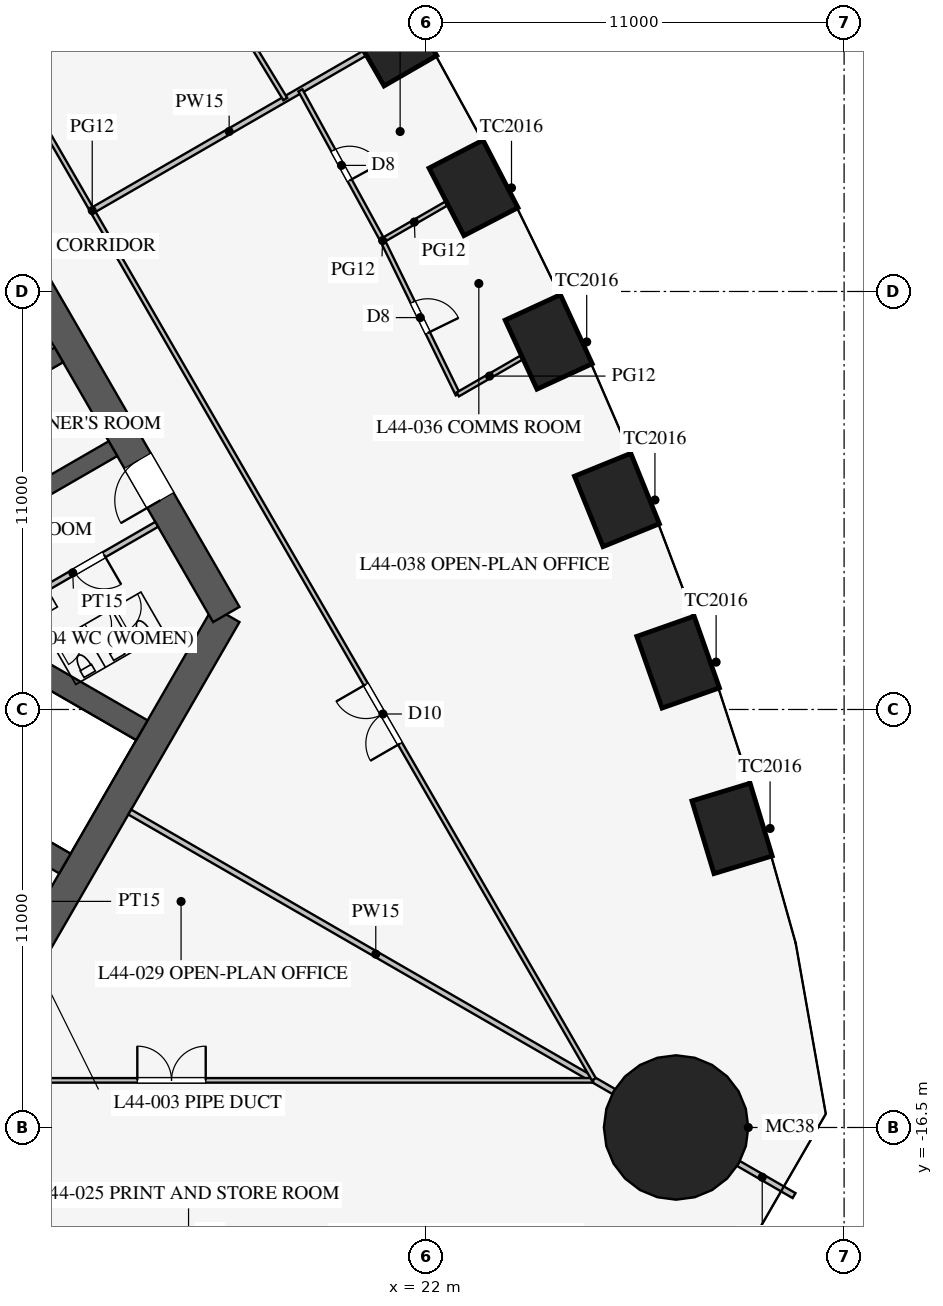
"""IFC4 building model, lengths in metres.
Left out: names, types, materials, properties, quantities, classifications, styles, units other than length and angle.
Written with IfcOpenShell. Run it as: python <this file> out.ifc"""

import sys

from ifc_helpers import new_model, si_unit, direction, frame, frame_2d, origin, origin_2d, place, context, subcontext, project, spatial, rectangle, circle, extrude, element, fill, save


model = new_model("IFC4")
c1 = context("Model", 3, precision=1e-05, world=origin(), true_north=direction((0.0, 1.0)))
c2 = subcontext(c1, "Body", "Model", "MODEL_VIEW")
j1 = project(units=[si_unit("LENGTHUNIT", "METRE"), si_unit("PLANEANGLEUNIT", "RADIAN")], contexts=[c1])
p1 = place(None, origin())
s1 = spatial("IfcSite", under=j1, at=p1, CompositionType="ELEMENT")
p2 = place(p1, origin())
s2 = spatial("IfcBuilding", under=s1, at=p2, CompositionType="ELEMENT")
p3 = place(p2, frame((0.0, 0.0, 193.9)))
s3 = spatial("IfcBuildingStorey", under=s2, at=p3, CompositionType="ELEMENT", Elevation=193.9)
for number, where, z_axis, x_axis in (
    (1, (30.052, -8.63, 0.0), (0.0, 0.0, 1.0), (-0.29, 0.957, 0.0)),
    (2, (28.632, -4.254, 0.0), (0.0, 0.0, 1.0), (-0.332, 0.943, 0.0)),
    (3, (27.022, 0.013, 0.0), (0.0, 0.0, 1.0), (-0.376, 0.927, 0.0)),
    (4, (25.227, 4.172, 0.0), (0.0, 0.0, 1.0), (-0.418, 0.908, 0.0)),
    (5, (23.248, 8.226, 0.0), (0.0, 0.0, 1.0), (-0.46, 0.888, 0.0)),
    (6, (21.088, 12.175, 0.0), (0.0, 0.0, 1.0), (-0.5, 0.866, 0.0)),
):
    element("IfcColumn", number, at=place(p3, frame(where, z_axis=z_axis, x_axis=x_axis)), inside=s3, PredefinedType="COLUMN", context=c2, shape_type="SweptSolid", body=[
        extrude(rectangle(XDim=2.0, YDim=1.6, at=origin_2d()), origin(), (0.0, 0.0, 1.0), 4.2),
    ])
p4 = place(p3, frame((28.579, -16.5, 0.0), z_axis=(0.0, 0.0, 1.0), x_axis=(1.0, 0.0, 0.0)))
e7 = element("IfcColumn", 7, at=p4, inside=s3, PredefinedType="COLUMN", context=c2, shape_type="SweptSolid", body=[
    extrude(circle(Radius=1.9, at=origin_2d()), origin(), (0.0, 0.0, 1.0), 4.2),
])
p5 = place(p3, frame((10.97, -13.0, 0.0), z_axis=(0.0, 0.0, 1.0), x_axis=(0.499995765644, 0.866027848477, 0.0)))
e8 = element("IfcWall", 8, at=p5, inside=s3, PredefinedType="SHEAR", context=c2, shape_type="SweptSolid", body=[
    extrude(rectangle(XDim=11.547, YDim=0.8, at=frame_2d((5.773, 0.0))), origin(), (0.0, 0.0, 1.0), 4.2),
])
p6 = place(p3, frame((16.743, -3.0, 0.0), z_axis=(0.0, 0.0, 1.0), x_axis=(-0.500002442456, 0.866023993627, 0.0)))
e9 = element("IfcWall", 9, at=p6, inside=s3, PredefinedType="SHEAR", context=c2, shape_type="SweptSolid", body=[
    extrude(rectangle(XDim=21.939, YDim=0.8, at=frame_2d((10.97, 0.0))), origin(), (0.0, 0.0, 1.0), 4.2),
])
p7 = place(p6, frame((17.27, 0.0, 0.0)))
e10 = element("IfcOpeningElement", 10, at=p7, cuts=e9, PredefinedType="OPENING", context=c2, shape_type="SweptSolid", body=[
    extrude(rectangle(XDim=1.2, YDim=2.1, at=frame_2d((0.6, 1.05))), frame((0.0, 0.41, 0.0), z_axis=(0.0, -1.0, 0.0), x_axis=(1.0, 0.0, 0.0)), (0.0, 0.0, 1.0), 0.82),
])
p8 = place(p6, frame((3.47, 0.0, 0.0)))
e11 = element("IfcOpeningElement", 11, at=p8, cuts=e9, PredefinedType="OPENING", context=c2, shape_type="SweptSolid", body=[
    extrude(rectangle(XDim=1.2, YDim=2.1, at=frame_2d((0.6, 1.05))), frame((0.0, 0.41, 0.0), z_axis=(0.0, -1.0, 0.0), x_axis=(1.0, 0.0, 0.0)), (0.0, 0.0, 1.0), 0.82),
])
for number, where, z_axis, x_axis in (
    (12, (11.532, 0.076, 0.0), (0.0, 0.0, 1.0), (0.866, 0.5, 0.0)),
    (13, (10.107, 2.544, 0.0), (0.0, 0.0, 1.0), (0.866, 0.5, 0.0)),
):
    element("IfcWall", number, at=place(p3, frame(where, z_axis=z_axis, x_axis=x_axis)), inside=s3, PredefinedType="SHEAR", context=c2, shape_type="SweptSolid", body=[
        extrude(rectangle(XDim=2.575, YDim=0.45, at=frame_2d((1.288, 0.0))), origin(), (0.0, 0.0, 1.0), 4.2),
    ])
for number, where, z_axis, x_axis in (
    (14, (4.638, -5.016, 0.0), (0.0, 0.0, 1.0), (0.866, -0.5, 0.0)),
    (15, (6.663, -1.509, 0.0), (0.0, 0.0, 1.0), (0.866, -0.5, 0.0)),
):
    element("IfcWall", number, at=place(p3, frame(where, z_axis=z_axis, x_axis=x_axis)), inside=s3, PredefinedType="SHEAR", context=c2, shape_type="SweptSolid", body=[
        extrude(rectangle(XDim=9.075, YDim=0.6, at=frame_2d((4.538, 0.0))), origin(), (0.0, 0.0, 1.0), 4.2),
    ])
p9 = place(p3, frame((10.495, -3.178, 0.0), z_axis=(0.0, 0.0, 1.0), x_axis=(0.86602216432, 0.500005610874, 0.0)))
e16 = element("IfcWall", 16, at=p9, inside=s3, PredefinedType="PARTITIONING", context=c2, shape_type="SweptSolid", body=[
    extrude(rectangle(XDim=5.1, YDim=0.15, at=frame_2d((2.55, 0.0))), origin(), (0.0, 0.0, 1.0), 4.0),
])
p10 = place(p9, frame((2.6, 0.0, 0.0)))
e17 = element("IfcOpeningElement", 17, at=p10, cuts=e16, PredefinedType="OPENING", context=c2, shape_type="SweptSolid", body=[
    extrude(rectangle(XDim=0.9, YDim=2.1, at=frame_2d((0.45, 1.05))), frame((0.0, 0.085, 0.0), z_axis=(0.0, -1.0, 0.0), x_axis=(1.0, 0.0, 0.0)), (0.0, 0.0, 1.0), 0.17),
])
p11 = place(p3, frame((14.203, -8.2, 0.0), z_axis=(0.0, 0.0, 1.0), x_axis=(0.866021600284, -0.500006587798, 0.0)))
e18 = element("IfcWall", 18, at=p11, inside=s3, PredefinedType="PARTITIONING", context=c2, shape_type="SweptSolid", body=[
    extrude(rectangle(XDim=14.95, YDim=0.15, at=frame_2d((7.475, 0.0))), origin(), (0.0, 0.0, 1.0), 2.4),
])
p12 = place(p3, frame((30.008, -17.325, 0.0), z_axis=(0.0, 0.0, 1.0), x_axis=(0.866013246922, -0.500021055713, 0.0)))
e19 = element("IfcWall", 19, at=p12, inside=s3, PredefinedType="PARTITIONING", context=c2, shape_type="SweptSolid", body=[
    extrude(rectangle(XDim=1.935, YDim=0.15, at=frame_2d((0.967, 0.0))), origin(), (0.0, 0.0, 1.0), 2.4),
])
p13 = place(p3, frame((-26.398, -15.26, 0.0), z_axis=(0.0, 0.0, 1.0), x_axis=(1.0, 0.0, 0.0)))
e20 = element("IfcWall", 20, at=p13, inside=s3, PredefinedType="PARTITIONING", context=c2, shape_type="SweptSolid", body=[
    extrude(rectangle(XDim=52.796, YDim=0.12, at=frame_2d((26.398, 0.0))), origin(), (0.0, 0.0, 1.0), 2.9),
])
p14 = place(p13, frame((10.2, 0.0, 0.15)))
e21 = element("IfcOpeningElement", 21, at=p14, cuts=e20, PredefinedType="OPENING", context=c2, shape_type="SweptSolid", body=[
    extrude(rectangle(XDim=1.8, YDim=2.1, at=frame_2d((0.9, 1.05))), frame((0.0, 0.07, 0.0), z_axis=(0.0, -1.0, 0.0), x_axis=(1.0, 0.0, 0.0)), (0.0, 0.0, 1.0), 0.14),
])
p15 = place(p13, frame((40.8, 0.0, 0.15)))
e22 = element("IfcOpeningElement", 22, at=p15, cuts=e20, PredefinedType="OPENING", context=c2, shape_type="SweptSolid", body=[
    extrude(rectangle(XDim=1.8, YDim=2.1, at=frame_2d((0.9, 1.05))), frame((0.0, 0.07, 0.0), z_axis=(0.0, -1.0, 0.0), x_axis=(1.0, 0.0, 0.0)), (0.0, 0.0, 1.0), 0.14),
])
p16 = place(p3, frame((13.268, 7.66, 0.0), z_axis=(0.0, 0.0, 1.0), x_axis=(0.866019499219, 0.500010226868, 0.0)))
e23 = element("IfcWall", 23, at=p16, inside=s3, PredefinedType="PARTITIONING", context=c2, shape_type="SweptSolid", body=[
    extrude(rectangle(XDim=8.2, YDim=0.15, at=frame_2d((4.1, 0.0))), origin(), (0.0, 0.0, 1.0), 2.992),
])
p17 = place(p3, frame((26.415, -15.231, 0.0), z_axis=(0.0, 0.0, 1.0), x_axis=(-0.50000091641, 0.866024874695, 0.0)))
e24 = element("IfcWall", 24, at=p17, inside=s3, PredefinedType="PARTITIONING", context=c2, shape_type="SweptSolid", body=[
    extrude(rectangle(XDim=52.796, YDim=0.12, at=frame_2d((26.398, 0.0))), origin(), (0.0, 0.0, 1.0), 2.9),
])
p18 = place(p17, frame((10.2, 0.0, 0.15)))
e25 = element("IfcOpeningElement", 25, at=p18, cuts=e24, PredefinedType="OPENING", context=c2, shape_type="SweptSolid", body=[
    extrude(rectangle(XDim=1.8, YDim=2.1, at=frame_2d((0.9, 1.05))), frame((0.0, 0.07, 0.0), z_axis=(0.0, -1.0, 0.0), x_axis=(1.0, 0.0, 0.0)), (0.0, 0.0, 1.0), 0.14),
])
p19 = place(p17, frame((40.8, 0.0, 0.15)))
e26 = element("IfcOpeningElement", 26, at=p19, cuts=e24, PredefinedType="OPENING", context=c2, shape_type="SweptSolid", body=[
    extrude(rectangle(XDim=1.8, YDim=2.1, at=frame_2d((0.9, 1.05))), frame((0.0, 0.07, 0.0), z_axis=(0.0, -1.0, 0.0), x_axis=(1.0, 0.0, 0.0)), (0.0, 0.0, 1.0), 0.14),
])
p20 = place(p3, frame((18.295, 10.563, 0.0), z_axis=(0.0, 0.0, 1.0), x_axis=(-0.519766265397, 0.854308509472, 0.0)))
e27 = element("IfcWall", 27, at=p20, inside=s3, PredefinedType="PARTITIONING", context=c2, shape_type="SweptSolid", body=[
    extrude(rectangle(XDim=4.501, YDim=0.12, at=frame_2d((2.25, 0.0))), origin(), (0.0, 0.0, 1.0), 2.9),
])
p21 = place(p20, frame((1.8, 0.0, 0.15)))
e28 = element("IfcOpeningElement", 28, at=p21, cuts=e27, PredefinedType="OPENING", context=c2, shape_type="SweptSolid", body=[
    extrude(rectangle(XDim=0.9, YDim=2.1, at=frame_2d((0.45, 1.05))), frame((0.0, 0.07, 0.0), z_axis=(0.0, -1.0, 0.0), x_axis=(1.0, 0.0, 0.0)), (0.0, 0.0, 1.0), 0.14),
])
p22 = place(p3, frame((20.854, 6.844, 0.0), z_axis=(0.0, 0.0, 1.0), x_axis=(-0.480014565702, 0.877260518155, 0.0)))
e29 = element("IfcWall", 29, at=p22, inside=s3, PredefinedType="PARTITIONING", context=c2, shape_type="SweptSolid", body=[
    extrude(rectangle(XDim=4.501, YDim=0.12, at=frame_2d((2.25, 0.0))), origin(), (0.0, 0.0, 1.0), 2.9),
])
p23 = place(p22, frame((1.8, 0.0, 0.15)))
e30 = element("IfcOpeningElement", 30, at=p23, cuts=e29, PredefinedType="OPENING", context=c2, shape_type="SweptSolid", body=[
    extrude(rectangle(XDim=0.9, YDim=2.1, at=frame_2d((0.45, 1.05))), frame((0.0, 0.07, 0.0), z_axis=(0.0, -1.0, 0.0), x_axis=(1.0, 0.0, 0.0)), (0.0, 0.0, 1.0), 0.14),
])
p24 = place(p3, frame((22.835, 2.792, 0.0), z_axis=(0.0, 0.0, 1.0), x_axis=(-0.43911984878, 0.898428493764, 0.0)))
e31 = element("IfcWall", 31, at=p24, inside=s3, PredefinedType="PARTITIONING", context=c2, shape_type="SweptSolid", body=[
    extrude(rectangle(XDim=4.511, YDim=0.12, at=frame_2d((2.255, 0.0))), origin(), (0.0, 0.0, 1.0), 2.9),
])
p25 = place(p24, frame((1.8, 0.0, 0.15)))
e32 = element("IfcOpeningElement", 32, at=p25, cuts=e31, PredefinedType="OPENING", context=c2, shape_type="SweptSolid", body=[
    extrude(rectangle(XDim=0.9, YDim=2.1, at=frame_2d((0.45, 1.05))), frame((0.0, 0.07, 0.0), z_axis=(0.0, -1.0, 0.0), x_axis=(1.0, 0.0, 0.0)), (0.0, 0.0, 1.0), 0.14),
])
p26 = place(p3, frame((20.854, 6.844, 0.0), z_axis=(0.0, 0.0, 1.0), x_axis=(0.866019431537, 0.500010344094, 0.0)))
e33 = element("IfcWall", 33, at=p26, inside=s3, PredefinedType="PARTITIONING", context=c2, shape_type="SweptSolid", body=[
    extrude(rectangle(XDim=1.933, YDim=0.12, at=frame_2d((0.967, 0.0))), origin(), (0.0, 0.0, 1.0), 2.9),
])
p27 = place(p3, frame((22.835, 2.792, 0.0), z_axis=(0.0, 0.0, 1.0), x_axis=(0.865997904316, 0.500047627452, 0.0)))
e34 = element("IfcWall", 34, at=p27, inside=s3, PredefinedType="PARTITIONING", context=c2, shape_type="SweptSolid", body=[
    extrude(rectangle(XDim=1.928, YDim=0.12, at=frame_2d((0.964, 0.0))), origin(), (0.0, 0.0, 1.0), 2.9),
])
p28 = place(p10, frame((0.9, 0.0, 0.0), z_axis=(0.0, 0.0, 1.0), x_axis=(-1.0, 0.0, 0.0)))
e35 = element("IfcDoor", 35, at=p28, inside=s3, OperationType="SINGLE_SWING_LEFT", PredefinedType="DOOR", context=c2, shape_type="SweptSolid", body=[
    extrude(rectangle(XDim=0.9, YDim=2.1, at=frame_2d((0.45, 1.05))), frame((0.0, 0.025, 0.0), z_axis=(0.0, -1.0, 0.0), x_axis=(1.0, 0.0, 0.0)), (0.0, 0.0, 1.0), 0.05),
])
fill(e17, e35)
p29 = place(p8, origin())
e36 = element("IfcDoor", 36, at=p29, inside=s3, OperationType="SINGLE_SWING_LEFT", PredefinedType="DOOR", context=c2, shape_type="SweptSolid", body=[
    extrude(rectangle(XDim=1.2, YDim=2.1, at=frame_2d((0.6, 1.05))), frame((0.0, 0.025, 0.0), z_axis=(0.0, -1.0, 0.0), x_axis=(1.0, 0.0, 0.0)), (0.0, 0.0, 1.0), 0.05),
])
fill(e11, e36)
p30 = place(p15, origin())
e37 = element("IfcDoor", 37, at=p30, inside=s3, OperationType="DOUBLE_DOOR_SINGLE_SWING", PredefinedType="DOOR", context=c2, shape_type="SweptSolid", body=[
    extrude(rectangle(XDim=1.8, YDim=2.1, at=frame_2d((0.9, 1.05))), frame((0.0, 0.025, 0.0), z_axis=(0.0, -1.0, 0.0), x_axis=(1.0, 0.0, 0.0)), (0.0, 0.0, 1.0), 0.05),
])
fill(e22, e37)
p31 = place(p23, frame((0.9, 0.0, 0.0), z_axis=(0.0, 0.0, 1.0), x_axis=(-1.0, 0.0, 0.0)))
e38 = element("IfcDoor", 38, at=p31, inside=s3, OperationType="SINGLE_SWING_RIGHT", PredefinedType="DOOR", context=c2, shape_type="SweptSolid", body=[
    extrude(rectangle(XDim=0.9, YDim=2.1, at=frame_2d((0.45, 1.05))), frame((0.0, 0.025, 0.0), z_axis=(0.0, -1.0, 0.0), x_axis=(1.0, 0.0, 0.0)), (0.0, 0.0, 1.0), 0.05),
])
fill(e30, e38)
p32 = place(p25, frame((0.9, 0.0, 0.0), z_axis=(0.0, 0.0, 1.0), x_axis=(-1.0, 0.0, 0.0)))
e39 = element("IfcDoor", 39, at=p32, inside=s3, OperationType="SINGLE_SWING_RIGHT", PredefinedType="DOOR", context=c2, shape_type="SweptSolid", body=[
    extrude(rectangle(XDim=0.9, YDim=2.1, at=frame_2d((0.45, 1.05))), frame((0.0, 0.025, 0.0), z_axis=(0.0, -1.0, 0.0), x_axis=(1.0, 0.0, 0.0)), (0.0, 0.0, 1.0), 0.05),
])
fill(e32, e39)
p33 = place(p18, origin())
e40 = element("IfcDoor", 40, at=p33, inside=s3, OperationType="DOUBLE_DOOR_SINGLE_SWING", PredefinedType="DOOR", context=c2, shape_type="SweptSolid", body=[
    extrude(rectangle(XDim=1.8, YDim=2.1, at=frame_2d((0.9, 1.05))), frame((0.0, 0.025, 0.0), z_axis=(0.0, -1.0, 0.0), x_axis=(1.0, 0.0, 0.0)), (0.0, 0.0, 1.0), 0.05),
])
fill(e25, e40)
save(model, sys.argv[1])
